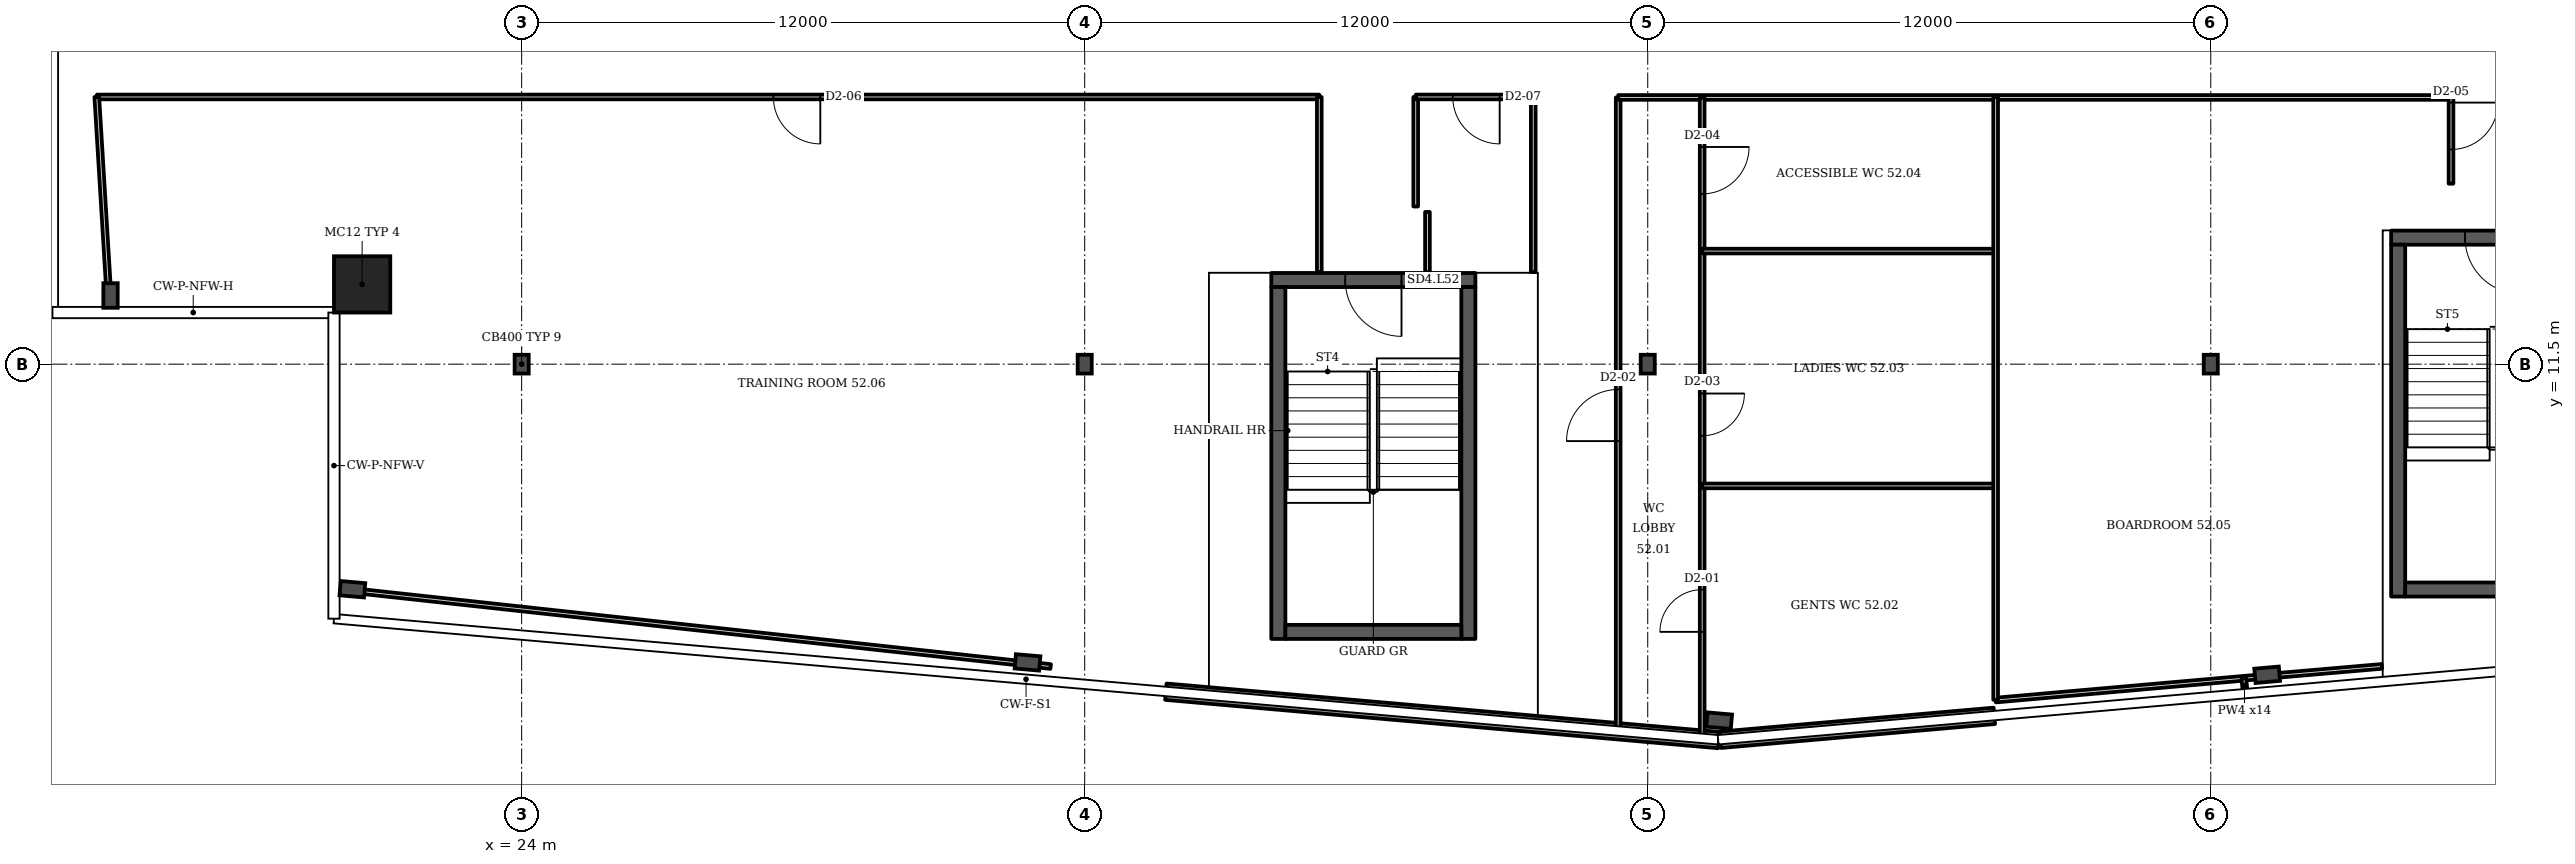
"""IFC4 building model, lengths in metres.
Left out: names, types, materials, properties, quantities, classifications, styles, units other than length and angle.
Written with IfcOpenShell. Run it as: python <this file> out.ifc"""

import sys

from ifc_helpers import new_model, si_unit, direction, frame, frame_2d, origin, origin_2d, place, context, subcontext, project, spatial, rectangle, i_section, extrude, element, fill, save


model = new_model("IFC4")
c1 = context("Model", 3, precision=1e-05, world=origin(), true_north=direction((0.0, 1.0)))
c2 = subcontext(c1, "Body", "Model", "MODEL_VIEW")
j1 = project(units=[si_unit("LENGTHUNIT", "METRE"), si_unit("PLANEANGLEUNIT", "RADIAN")], contexts=[c1])
p1 = place(None, origin())
s1 = spatial("IfcSite", under=j1, at=p1, CompositionType="ELEMENT")
p2 = place(p1, origin())
s2 = spatial("IfcBuilding", under=s1, at=p2, CompositionType="ELEMENT")
p3 = place(p2, frame((0.0, 0.0, 210.7)))
s3 = spatial("IfcBuildingStorey", under=s2, at=p3, CompositionType="ELEMENT", Elevation=210.7)
p4 = place(p3, frame((20.6, 13.2, 0.0), z_axis=(0.0, 0.0, 1.0), x_axis=(1.0, 0.0, 0.0)))
e1 = element("IfcColumn", 1, at=p4, inside=s3, PredefinedType="COLUMN", context=c2, shape_type="SweptSolid", body=[
    extrude(rectangle(XDim=1.2, YDim=1.2, at=origin_2d()), origin(), (0.0, 0.0, 1.0), 3.6),
])
for number, where, z_axis, x_axis in (
    (2, (20.392, 6.703, 0.0), (0.0, 0.0, 1.0), (-0.087, -0.996, 0.0)),
    (3, (34.781, 5.143, 0.0), (0.0, 0.0, 1.0), (-0.087, -0.996, 0.0)),
    (4, (49.523, 3.902, 0.0), (0.0, 0.0, 1.0), (-0.087, -0.996, 0.0)),
    (5, (61.202, 4.879, 0.0), (0.0, 0.0, 1.0), (0.087, -0.996, 0.0)),
    (6, (15.238, 12.963, 0.0), (0.0, 0.0, 1.0), (-1.0, 0.0, 0.0)),
):
    element("IfcColumn", number, at=place(p3, frame(where, z_axis=z_axis, x_axis=x_axis)), inside=s3, PredefinedType="COLUMN", context=c2, shape_type="SweptSolid", body=[
        extrude(i_section(OverallWidth=0.306, OverallDepth=0.524, WebThickness=0.021, FlangeThickness=0.04, FilletRadius=0.027, at=origin_2d()), origin(), (0.0, 0.0, 1.0), 3.6),
    ])
for number, where, z_axis, x_axis in (
    (7, (24.0, 11.5, 0.0), (0.0, 0.0, 1.0), (1.0, 0.0, 0.0)),
    (8, (36.0, 11.5, 0.0), (0.0, 0.0, 1.0), (1.0, 0.0, 0.0)),
    (9, (48.0, 11.5, 0.0), (0.0, 0.0, 1.0), (1.0, 0.0, 0.0)),
    (10, (60.0, 11.5, 0.0), (0.0, 0.0, 1.0), (1.0, 0.0, 0.0)),
):
    element("IfcColumn", number, at=place(p3, frame(where, z_axis=z_axis, x_axis=x_axis)), inside=s3, PredefinedType="COLUMN", context=c2, shape_type="SweptSolid", body=[
        extrude(i_section(OverallWidth=0.3, OverallDepth=0.4, WebThickness=0.013, FlangeThickness=0.024, FilletRadius=0.027, at=origin_2d()), origin(), (0.0, 0.0, 1.0), 3.6),
    ])
p5 = place(p3, frame((37.729, 4.519, 0.0), z_axis=(0.0, 0.0, 1.0), x_axis=(0.99619, -0.087167, 0.0)))
e11 = element("IfcWall", 11, at=p5, inside=s3, PredefinedType="SOLIDWALL", context=c2, shape_type="SweptSolid", body=[
    extrude(rectangle(XDim=11.831, YDim=0.35, at=frame_2d((5.915, 0.0))), origin(), (0.0, 0.0, 1.0), 1.0),
])
p6 = place(p3, frame((49.545, 3.493, 0.0), z_axis=(0.0, 0.0, 1.0), x_axis=(0.996196, 0.087138, 0.0)))
e12 = element("IfcWall", 12, at=p6, inside=s3, PredefinedType="SOLIDWALL", context=c2, shape_type="SweptSolid", body=[
    extrude(rectangle(XDim=5.864, YDim=0.35, at=frame_2d((2.932, 0.0))), origin(), (0.0, 0.0, 1.0), 1.0),
])
p7 = place(p3, frame((39.977, 13.293, 0.0), z_axis=(0.0, 0.0, 1.0), x_axis=(1.0, 0.0, 0.0)))
e13 = element("IfcWall", 13, at=p7, inside=s3, PredefinedType="SHEAR", context=c2, shape_type="SweptSolid", body=[
    extrude(rectangle(XDim=4.35, YDim=0.3, at=frame_2d((2.175, 0.0))), origin(), (0.0, 0.0, 1.0), 3.2),
])
p8 = place(p7, frame((1.575, 0.0, 0.0)))
e14 = element("IfcOpeningElement", 14, at=p8, cuts=e13, PredefinedType="OPENING", context=c2, shape_type="SweptSolid", body=[
    extrude(rectangle(XDim=1.2, YDim=2.1, at=frame_2d((0.6, 1.05))), frame((0.0, 0.16, 0.0), z_axis=(0.0, -1.0, 0.0), x_axis=(1.0, 0.0, 0.0)), (0.0, 0.0, 1.0), 0.32),
])
p9 = place(p3, frame((63.844, 14.196, 0.0), z_axis=(0.0, 0.0, 1.0), x_axis=(1.0, 0.0, 0.0)))
e15 = element("IfcWall", 15, at=p9, inside=s3, PredefinedType="SHEAR", context=c2, shape_type="SweptSolid", body=[
    extrude(rectangle(XDim=4.35, YDim=0.3, at=frame_2d((2.175, 0.0))), origin(), (0.0, 0.0, 1.0), 3.2),
])
p10 = place(p9, frame((1.575, 0.0, 0.0)))
e16 = element("IfcOpeningElement", 16, at=p10, cuts=e15, PredefinedType="OPENING", context=c2, shape_type="SweptSolid", body=[
    extrude(rectangle(XDim=1.2, YDim=2.1, at=frame_2d((0.6, 1.05))), frame((0.0, 0.16, 0.0), z_axis=(0.0, -1.0, 0.0), x_axis=(1.0, 0.0, 0.0)), (0.0, 0.0, 1.0), 0.32),
])
p11 = place(p3, frame((14.945, 17.195, 0.0), z_axis=(0.0, 0.0, 1.0), x_axis=(1.0, 0.0, 0.0)))
e17 = element("IfcWall", 17, at=p11, inside=s3, PredefinedType="PARTITIONING", context=c2, shape_type="SweptSolid", body=[
    extrude(rectangle(XDim=26.055, YDim=0.1, at=frame_2d((13.027, 0.0))), origin(), (0.0, 0.0, 1.0), 3.2),
])
p12 = place(p11, frame((14.42, 0.0, 0.0)))
e18 = element("IfcOpeningElement", 18, at=p12, cuts=e17, PredefinedType="OPENING", context=c2, shape_type="SweptSolid", body=[
    extrude(rectangle(XDim=1.0, YDim=2.1, at=frame_2d((0.5, 1.05))), frame((0.0, 0.06, 0.0), z_axis=(0.0, -1.0, 0.0), x_axis=(1.0, 0.0, 0.0)), (0.0, 0.0, 1.0), 0.12),
])
p13 = place(p3, frame((15.224, 12.62, 0.0), z_axis=(0.0, 0.0, 1.0), x_axis=(-0.060903, 0.99814, 0.0)))
e19 = element("IfcWall", 19, at=p13, inside=s3, PredefinedType="PARTITIONING", context=c2, shape_type="SweptSolid", body=[
    extrude(rectangle(XDim=4.586, YDim=0.1, at=frame_2d((2.293, 0.0))), origin(), (0.0, 0.0, 1.0), 3.2),
])
p14 = place(p3, frame((35.275, 5.055, 0.0), z_axis=(0.0, 0.0, 1.0), x_axis=(-0.994128, 0.108228, 0.0)))
e20 = element("IfcWall", 20, at=p14, inside=s3, PredefinedType="PARTITIONING", context=c2, shape_type="SweptSolid", body=[
    extrude(rectangle(XDim=15.335, YDim=0.1, at=frame_2d((7.667, 0.0))), origin(), (0.0, 0.0, 1.0), 2.58),
])
p15 = place(p3, frame((41.0, 13.463, 0.0), z_axis=(0.0, 0.0, 1.0), x_axis=(0.0, 1.0, 0.0)))
e21 = element("IfcWall", 21, at=p15, inside=s3, PredefinedType="PARTITIONING", context=c2, shape_type="SweptSolid", body=[
    extrude(rectangle(XDim=3.732, YDim=0.1, at=frame_2d((1.866, 0.0))), origin(), (0.0, 0.0, 1.0), 3.2),
])
p16 = place(p3, frame((43.055, 14.86, 0.0), z_axis=(0.0, 0.0, 1.0), x_axis=(0.0, 1.0, 0.0)))
e22 = element("IfcWall", 22, at=p16, inside=s3, PredefinedType="PARTITIONING", context=c2, shape_type="SweptSolid", body=[
    extrude(rectangle(XDim=2.335, YDim=0.1, at=frame_2d((1.167, 0.0))), origin(), (0.0, 0.0, 1.0), 3.2),
])
p17 = place(p3, frame((43.055, 17.195, 0.0), z_axis=(0.0, 0.0, 1.0), x_axis=(1.0, 0.0, 0.0)))
e23 = element("IfcWall", 23, at=p17, inside=s3, PredefinedType="PARTITIONING", context=c2, shape_type="SweptSolid", body=[
    extrude(rectangle(XDim=2.505, YDim=0.1, at=frame_2d((1.252, 0.0))), origin(), (0.0, 0.0, 1.0), 3.2),
])
p18 = place(p17, frame((0.789, 0.0, 0.0)))
e24 = element("IfcOpeningElement", 24, at=p18, cuts=e23, PredefinedType="OPENING", context=c2, shape_type="SweptSolid", body=[
    extrude(rectangle(XDim=1.0, YDim=2.1, at=frame_2d((0.5, 1.05))), frame((0.0, 0.06, 0.0), z_axis=(0.0, -1.0, 0.0), x_axis=(1.0, 0.0, 0.0)), (0.0, 0.0, 1.0), 0.12),
])
p19 = place(p3, frame((43.305, 13.463, 0.0), z_axis=(0.0, 0.0, 1.0), x_axis=(0.0, 1.0, 0.0)))
e25 = element("IfcWall", 25, at=p19, inside=s3, PredefinedType="PARTITIONING", context=c2, shape_type="SweptSolid", body=[
    extrude(rectangle(XDim=1.282, YDim=0.1, at=frame_2d((0.641, 0.0))), origin(), (0.0, 0.0, 1.0), 3.2),
])
p20 = place(p3, frame((45.56, 13.463, 0.0), z_axis=(0.0, 0.0, 1.0), x_axis=(0.0, 1.0, 0.0)))
e26 = element("IfcWall", 26, at=p20, inside=s3, PredefinedType="PARTITIONING", context=c2, shape_type="SweptSolid", body=[
    extrude(rectangle(XDim=3.732, YDim=0.1, at=frame_2d((1.866, 0.0))), origin(), (0.0, 0.0, 1.0), 3.2),
])
p21 = place(p3, frame((47.37, 3.701, 0.0), z_axis=(0.0, 0.0, 1.0), x_axis=(0.0, 1.0, 0.0)))
e27 = element("IfcWall", 27, at=p21, inside=s3, PredefinedType="PARTITIONING", context=c2, shape_type="SweptSolid", body=[
    extrude(rectangle(XDim=13.484, YDim=0.1, at=frame_2d((6.742, 0.0))), origin(), (0.0, 0.0, 1.0), 2.58),
])
p22 = place(p21, frame((6.159, 0.0, 0.0)))
e28 = element("IfcOpeningElement", 28, at=p22, cuts=e27, PredefinedType="OPENING", context=c2, shape_type="SweptSolid", body=[
    extrude(rectangle(XDim=1.1, YDim=2.1, at=frame_2d((0.55, 1.05))), frame((0.0, 0.06, 0.0), z_axis=(0.0, -1.0, 0.0), x_axis=(1.0, 0.0, 0.0)), (0.0, 0.0, 1.0), 0.12),
])
p23 = place(p3, frame((47.37, 17.185, 0.0), z_axis=(0.0, 0.0, 1.0), x_axis=(1.0, 0.0, 0.0)))
e29 = element("IfcWall", 29, at=p23, inside=s3, PredefinedType="PARTITIONING", context=c2, shape_type="SweptSolid", body=[
    extrude(rectangle(XDim=17.75, YDim=0.1, at=frame_2d((8.875, 0.0))), origin(), (0.0, 0.0, 1.0), 3.2),
])
p24 = place(p3, frame((49.16, 3.544, 0.0), z_axis=(0.0, 0.0, 1.0), x_axis=(0.0, 1.0, 0.0)))
e30 = element("IfcWall", 30, at=p24, inside=s3, PredefinedType="PARTITIONING", context=c2, shape_type="SweptSolid", body=[
    extrude(rectangle(XDim=13.641, YDim=0.1, at=frame_2d((6.821, 0.0))), origin(), (0.0, 0.0, 1.0), 2.58),
])
p25 = place(p24, frame((2.25, 0.0, 0.0)))
e31 = element("IfcOpeningElement", 31, at=p25, cuts=e30, PredefinedType="OPENING", context=c2, shape_type="SweptSolid", body=[
    extrude(rectangle(XDim=0.9, YDim=2.1, at=frame_2d((0.45, 1.05))), frame((0.0, 0.06, 0.0), z_axis=(0.0, -1.0, 0.0), x_axis=(1.0, 0.0, 0.0)), (0.0, 0.0, 1.0), 0.12),
])
p26 = place(p24, frame((6.43, 0.0, 0.0)))
e32 = element("IfcOpeningElement", 32, at=p26, cuts=e30, PredefinedType="OPENING", context=c2, shape_type="SweptSolid", body=[
    extrude(rectangle(XDim=0.9, YDim=2.1, at=frame_2d((0.45, 1.05))), frame((0.0, 0.06, 0.0), z_axis=(0.0, -1.0, 0.0), x_axis=(1.0, 0.0, 0.0)), (0.0, 0.0, 1.0), 0.12),
])
p27 = place(p24, frame((11.585, 0.0, 0.0)))
e33 = element("IfcOpeningElement", 33, at=p27, cuts=e30, PredefinedType="OPENING", context=c2, shape_type="SweptSolid", body=[
    extrude(rectangle(XDim=1.0, YDim=2.1, at=frame_2d((0.5, 1.05))), frame((0.0, 0.06, 0.0), z_axis=(0.0, -1.0, 0.0), x_axis=(1.0, 0.0, 0.0)), (0.0, 0.0, 1.0), 0.12),
])
for number, where, z_axis, x_axis in (
    (34, (49.16, 8.905, 0.0), (0.0, 0.0, 1.0), (1.0, 0.0, 0.0)),
    (35, (49.16, 13.91, 0.0), (0.0, 0.0, 1.0), (1.0, 0.0, 0.0)),
):
    element("IfcWall", number, at=place(p3, frame(where, z_axis=z_axis, x_axis=x_axis)), inside=s3, PredefinedType="PARTITIONING", context=c2, shape_type="SweptSolid", body=[
        extrude(rectangle(XDim=6.255, YDim=0.1, at=frame_2d((3.127, 0.0))), origin(), (0.0, 0.0, 1.0), 3.2),
    ])
p28 = place(p3, frame((55.415, 4.34, 0.0), z_axis=(0.0, 0.0, 1.0), x_axis=(0.996159, 0.087534, 0.0)))
e36 = element("IfcWall", 36, at=p28, inside=s3, PredefinedType="PARTITIONING", context=c2, shape_type="SweptSolid", body=[
    extrude(rectangle(XDim=5.31, YDim=0.1, at=frame_2d((2.655, 0.0))), origin(), (0.0, 0.0, 1.0), 2.58),
])
p29 = place(p3, frame((55.415, 4.345, 0.0), z_axis=(0.0, 0.0, 1.0), x_axis=(0.0, 1.0, 0.0)))
e37 = element("IfcWall", 37, at=p29, inside=s3, PredefinedType="PARTITIONING", context=c2, shape_type="SweptSolid", body=[
    extrude(rectangle(XDim=12.85, YDim=0.1, at=frame_2d((6.425, 0.0))), origin(), (0.0, 0.0, 1.0), 3.2),
])
p30 = place(p3, frame((60.705, 4.805, 0.0), z_axis=(0.0, 0.0, 1.0), x_axis=(0.996324, 0.085692, 0.0)))
e38 = element("IfcWall", 38, at=p30, inside=s3, PredefinedType="PARTITIONING", context=c2, shape_type="SweptSolid", body=[
    extrude(rectangle(XDim=2.955, YDim=0.1, at=frame_2d((1.477, 0.0))), origin(), (0.0, 0.0, 1.0), 2.58),
])
p31 = place(p3, frame((60.733, 4.497, 0.0), z_axis=(0.0, 0.0, 1.0), x_axis=(-0.090037, 0.995936, 0.0)))
e39 = element("IfcWall", 39, at=p31, inside=s3, PredefinedType="PARTITIONING", context=c2, shape_type="SweptSolid", body=[
    extrude(rectangle(XDim=0.309, YDim=0.1, at=frame_2d((0.155, 0.0))), origin(), (0.0, 0.0, 1.0), 3.2),
])
p32 = place(p3, frame((65.12, 15.346, 0.0), z_axis=(0.0, 0.0, 1.0), x_axis=(0.0, 1.0, 0.0)))
e40 = element("IfcWall", 40, at=p32, inside=s3, PredefinedType="PARTITIONING", context=c2, shape_type="SweptSolid", body=[
    extrude(rectangle(XDim=1.849, YDim=0.1, at=frame_2d((0.924, 0.0))), origin(), (0.0, 0.0, 1.0), 3.2),
])
p33 = place(p32, frame((0.729, 0.0, 0.0)))
e41 = element("IfcOpeningElement", 41, at=p33, cuts=e40, PredefinedType="OPENING", context=c2, shape_type="SweptSolid", body=[
    extrude(rectangle(XDim=1.0, YDim=2.1, at=frame_2d((0.5, 1.05))), frame((0.0, 0.06, 0.0), z_axis=(0.0, -1.0, 0.0), x_axis=(1.0, 0.0, 0.0)), (0.0, 0.0, 1.0), 0.12),
])
for number, where, z_axis, x_axis in (
    (42, (40.127, 5.643, 0.0), (0.0, 0.0, 1.0), (0.0, 1.0, 0.0)),
    (43, (44.177, 5.643, 0.0), (0.0, 0.0, 1.0), (0.0, 1.0, 0.0)),
):
    element("IfcWall", number, at=place(p3, frame(where, z_axis=z_axis, x_axis=x_axis)), inside=s3, PredefinedType="SHEAR", context=c2, shape_type="SweptSolid", body=[
        extrude(rectangle(XDim=7.5, YDim=0.3, at=frame_2d((3.75, 0.0))), origin(), (0.0, 0.0, 1.0), 3.2),
    ])
p34 = place(p3, frame((40.277, 5.793, 0.0), z_axis=(0.0, 0.0, 1.0), x_axis=(1.0, 0.0, 0.0)))
e44 = element("IfcWall", 44, at=p34, inside=s3, PredefinedType="SHEAR", context=c2, shape_type="SweptSolid", body=[
    extrude(rectangle(XDim=3.75, YDim=0.3, at=frame_2d((1.875, 0.0))), origin(), (0.0, 0.0, 1.0), 3.2),
])
p35 = place(p3, frame((63.994, 6.546, 0.0), z_axis=(0.0, 0.0, 1.0), x_axis=(0.0, 1.0, 0.0)))
e45 = element("IfcWall", 45, at=p35, inside=s3, PredefinedType="SHEAR", context=c2, shape_type="SweptSolid", body=[
    extrude(rectangle(XDim=7.5, YDim=0.3, at=frame_2d((3.75, 0.0))), origin(), (0.0, 0.0, 1.0), 3.2),
])
p36 = place(p3, frame((64.144, 6.696, 0.0), z_axis=(0.0, 0.0, 1.0), x_axis=(1.0, 0.0, 0.0)))
e46 = element("IfcWall", 46, at=p36, inside=s3, PredefinedType="SHEAR", context=c2, shape_type="SweptSolid", body=[
    extrude(rectangle(XDim=3.75, YDim=0.3, at=frame_2d((1.875, 0.0))), origin(), (0.0, 0.0, 1.0), 3.2),
])
p37 = place(p8, origin())
e47 = element("IfcDoor", 47, at=p37, inside=s3, OperationType="SINGLE_SWING_RIGHT", PredefinedType="DOOR", context=c2, shape_type="SweptSolid", body=[
    extrude(rectangle(XDim=1.2, YDim=2.1, at=frame_2d((0.6, 1.05))), frame((0.0, 0.025, 0.0), z_axis=(0.0, -1.0, 0.0), x_axis=(1.0, 0.0, 0.0)), (0.0, 0.0, 1.0), 0.05),
])
fill(e14, e47)
p38 = place(p10, origin())
e48 = element("IfcDoor", 48, at=p38, inside=s3, OperationType="SINGLE_SWING_RIGHT", PredefinedType="DOOR", context=c2, shape_type="SweptSolid", body=[
    extrude(rectangle(XDim=1.2, YDim=2.1, at=frame_2d((0.6, 1.05))), frame((0.0, 0.025, 0.0), z_axis=(0.0, -1.0, 0.0), x_axis=(1.0, 0.0, 0.0)), (0.0, 0.0, 1.0), 0.05),
])
fill(e16, e48)
p39 = place(p25, origin())
e49 = element("IfcDoor", 49, at=p39, inside=s3, OperationType="SINGLE_SWING_LEFT", PredefinedType="DOOR", context=c2, shape_type="SweptSolid", body=[
    extrude(rectangle(XDim=0.9, YDim=2.1, at=frame_2d((0.45, 1.05))), frame((0.0, 0.025, 0.0), z_axis=(0.0, -1.0, 0.0), x_axis=(1.0, 0.0, 0.0)), (0.0, 0.0, 1.0), 0.05),
])
fill(e31, e49)
p40 = place(p22, origin())
e50 = element("IfcDoor", 50, at=p40, inside=s3, OperationType="SINGLE_SWING_LEFT", PredefinedType="DOOR", context=c2, shape_type="SweptSolid", body=[
    extrude(rectangle(XDim=1.1, YDim=2.1, at=frame_2d((0.55, 1.05))), frame((0.0, 0.025, 0.0), z_axis=(0.0, -1.0, 0.0), x_axis=(1.0, 0.0, 0.0)), (0.0, 0.0, 1.0), 0.05),
])
fill(e28, e50)
p41 = place(p26, origin())
e51 = element("IfcDoor", 51, at=p41, inside=s3, OperationType="SINGLE_SWING_RIGHT", PredefinedType="DOOR", context=c2, shape_type="SweptSolid", body=[
    extrude(rectangle(XDim=0.9, YDim=2.1, at=frame_2d((0.45, 1.05))), frame((0.0, 0.025, 0.0), z_axis=(0.0, -1.0, 0.0), x_axis=(1.0, 0.0, 0.0)), (0.0, 0.0, 1.0), 0.05),
])
fill(e32, e51)
p42 = place(p27, origin())
e52 = element("IfcDoor", 52, at=p42, inside=s3, OperationType="SINGLE_SWING_RIGHT", PredefinedType="DOOR", context=c2, shape_type="SweptSolid", body=[
    extrude(rectangle(XDim=1.0, YDim=2.1, at=frame_2d((0.5, 1.05))), frame((0.0, 0.025, 0.0), z_axis=(0.0, -1.0, 0.0), x_axis=(1.0, 0.0, 0.0)), (0.0, 0.0, 1.0), 0.05),
])
fill(e33, e52)
p43 = place(p33, origin())
e53 = element("IfcDoor", 53, at=p43, inside=s3, OperationType="SINGLE_SWING_RIGHT", PredefinedType="DOOR", context=c2, shape_type="SweptSolid", body=[
    extrude(rectangle(XDim=1.0, YDim=2.1, at=frame_2d((0.5, 1.05))), frame((0.0, 0.025, 0.0), z_axis=(0.0, -1.0, 0.0), x_axis=(1.0, 0.0, 0.0)), (0.0, 0.0, 1.0), 0.05),
])
fill(e41, e53)
p44 = place(p12, origin())
e54 = element("IfcDoor", 54, at=p44, inside=s3, OperationType="SINGLE_SWING_RIGHT", PredefinedType="DOOR", context=c2, shape_type="SweptSolid", body=[
    extrude(rectangle(XDim=1.0, YDim=2.1, at=frame_2d((0.5, 1.05))), frame((0.0, 0.025, 0.0), z_axis=(0.0, -1.0, 0.0), x_axis=(1.0, 0.0, 0.0)), (0.0, 0.0, 1.0), 0.05),
])
fill(e18, e54)
p45 = place(p18, origin())
e55 = element("IfcDoor", 55, at=p45, inside=s3, OperationType="SINGLE_SWING_RIGHT", PredefinedType="DOOR", context=c2, shape_type="SweptSolid", body=[
    extrude(rectangle(XDim=1.0, YDim=2.1, at=frame_2d((0.5, 1.05))), frame((0.0, 0.025, 0.0), z_axis=(0.0, -1.0, 0.0), x_axis=(1.0, 0.0, 0.0)), (0.0, 0.0, 1.0), 0.05),
])
fill(e24, e55)
save(model, sys.argv[1])
